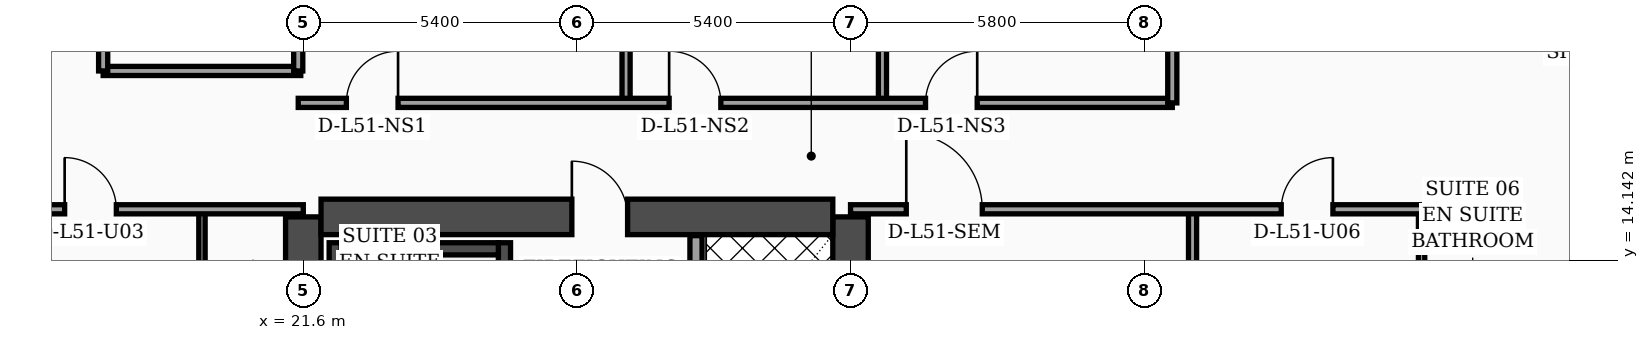
"""IFC4 building model, lengths in metres.
Left out: names, types, materials, properties, quantities, classifications, styles, units other than length and angle.
Written with IfcOpenShell. Run it as: python <this file> out.ifc"""

import sys

from ifc_helpers import new_model, si_unit, direction, frame, frame_2d, origin, place, context, subcontext, project, spatial, rectangle, extrude, element, fill, save


model = new_model("IFC4")
c1 = context("Model", 3, precision=1e-05, world=origin(), true_north=direction((0.0, 1.0)))
c2 = subcontext(c1, "Body", "Model", "MODEL_VIEW")
j1 = project(units=[si_unit("LENGTHUNIT", "METRE"), si_unit("PLANEANGLEUNIT", "RADIAN")], contexts=[c1])
p1 = place(None, origin())
s1 = spatial("IfcSite", under=j1, at=p1, CompositionType="ELEMENT")
p2 = place(p1, origin())
s2 = spatial("IfcBuilding", under=s1, at=p2, CompositionType="ELEMENT")
p3 = place(p2, frame((0.0, 0.0, 207.2)))
s3 = spatial("IfcBuildingStorey", under=s2, at=p3, CompositionType="ELEMENT", Elevation=207.2)
for number, where, z_axis, x_axis in (
    (1, (21.6, 4.6, 0.0), (0.0, 0.0, 1.0), (0.0, 1.0, 0.0)),
    (2, (32.4, 4.6, 0.0), (0.0, 0.0, 1.0), (0.0, 1.0, 0.0)),
):
    element("IfcWall", number, at=place(p3, frame(where, z_axis=z_axis, x_axis=x_axis)), inside=s3, PredefinedType="SHEAR", context=c2, shape_type="SweptSolid", body=[
        extrude(rectangle(XDim=10.4, YDim=0.7, at=frame_2d((5.2, 0.0))), origin(), (0.0, 0.0, 1.0), 3.56),
    ])
p4 = place(p3, frame((21.95, 15.0, 0.0), z_axis=(0.0, 0.0, 1.0), x_axis=(1.0, 0.0, 0.0)))
e3 = element("IfcWall", 3, at=p4, inside=s3, PredefinedType="SHEAR", context=c2, shape_type="SweptSolid", body=[
    extrude(rectangle(XDim=10.1, YDim=0.7, at=frame_2d((5.05, 0.0))), origin(), (0.0, 0.0, 1.0), 3.56),
])
p5 = place(p4, frame((4.95, 0.0, 0.0)))
e4 = element("IfcOpeningElement", 4, at=p5, cuts=e3, PredefinedType="OPENING", context=c2, shape_type="SweptSolid", body=[
    extrude(rectangle(XDim=1.1, YDim=2.2, at=frame_2d((0.55, 1.1))), frame((0.0, 0.36, 0.0), z_axis=(0.0, -1.0, 0.0), x_axis=(1.0, 0.0, 0.0)), (0.0, 0.0, 1.0), 0.72),
])
p6 = place(p3, frame((22.23, 4.95, 0.0), z_axis=(0.0, 0.0, 1.0), x_axis=(0.0, 1.0, 0.0)))
e5 = element("IfcWall", 5, at=p6, inside=s3, PredefinedType="SOLIDWALL", context=c2, shape_type="SweptSolid", body=[
    extrude(rectangle(XDim=9.54, YDim=0.24, at=frame_2d((4.77, 0.0))), origin(), (0.0, 0.0, 1.0), 3.56),
])
p7 = place(p3, frame((25.57, 4.95, 0.0), z_axis=(0.0, 0.0, 1.0), x_axis=(0.0, 1.0, 0.0)))
e6 = element("IfcWall", 6, at=p7, inside=s3, PredefinedType="SOLIDWALL", context=c2, shape_type="SweptSolid", body=[
    extrude(rectangle(XDim=9.54, YDim=0.24, at=frame_2d((4.77, 0.0))), origin(), (0.0, 0.0, 1.0), 3.56),
])
p8 = place(p7, frame((0.35, 0.0, 0.0)))
e7 = element("IfcOpeningElement", 7, at=p8, cuts=e6, PredefinedType="OPENING", context=c2, shape_type="SweptSolid", body=[
    extrude(rectangle(XDim=1.15, YDim=2.2, at=frame_2d((0.575, 1.1))), frame((0.0, 0.13, 0.0), z_axis=(0.0, -1.0, 0.0), x_axis=(1.0, 0.0, 0.0)), (0.0, 0.0, 1.0), 0.26),
])
p9 = place(p3, frame((22.35, 14.37, 0.0), z_axis=(0.0, 0.0, 1.0), x_axis=(1.0, 0.0, 0.0)))
e8 = element("IfcWall", 8, at=p9, inside=s3, PredefinedType="SOLIDWALL", context=c2, shape_type="SweptSolid", body=[
    extrude(rectangle(XDim=3.1, YDim=0.24, at=frame_2d((1.55, 0.0))), origin(), (0.0, 0.0, 1.0), 3.56),
])
p10 = place(p3, frame((52.23, 5.505, 0.0), z_axis=(0.0, 0.0, 1.0), x_axis=(-0.300509063924, 0.953778958931, 0.0)))
e9 = element("IfcWall", 9, at=p10, inside=s3, PredefinedType="SOLIDWALL", context=c2, shape_type="SweptSolid", body=[
    extrude(rectangle(XDim=30.814, YDim=0.32, at=frame_2d((15.407, 0.0))), origin(), (0.0, 0.0, 1.0), 3.56),
])
p11 = place(p10, frame((18.796, 0.0, 0.0)))
e10 = element("IfcOpeningElement", 10, at=p11, cuts=e9, PredefinedType="OPENING", context=c2, shape_type="SweptSolid", body=[
    extrude(rectangle(XDim=1.4, YDim=2.25, at=frame_2d((0.7, 1.125))), frame((0.0, 0.17, 0.0), z_axis=(0.0, -1.0, 0.0), x_axis=(1.0, 0.0, 0.0)), (0.0, 0.0, 1.0), 0.34),
])
p12 = place(p10, frame((4.437, 0.0, 0.7)))
e11 = element("IfcOpeningElement", 11, at=p12, cuts=e9, PredefinedType="OPENING", context=c2, shape_type="SweptSolid", body=[
    extrude(rectangle(XDim=1.6, YDim=1.65, at=frame_2d((0.8, 0.825))), frame((0.0, 0.17, 0.0), z_axis=(0.0, -1.0, 0.0), x_axis=(1.0, 0.0, 0.0)), (0.0, 0.0, 1.0), 0.34),
])
p13 = place(p10, frame((9.889, 0.0, 0.7)))
e12 = element("IfcOpeningElement", 12, at=p13, cuts=e9, PredefinedType="OPENING", context=c2, shape_type="SweptSolid", body=[
    extrude(rectangle(XDim=1.6, YDim=1.65, at=frame_2d((0.8, 0.825))), frame((0.0, 0.17, 0.0), z_axis=(0.0, -1.0, 0.0), x_axis=(1.0, 0.0, 0.0)), (0.0, 0.0, 1.0), 0.34),
])
p14 = place(p10, frame((1.6, 0.0, 0.75)))
e13 = element("IfcOpeningElement", 13, at=p14, cuts=e9, PredefinedType="OPENING", context=c2, shape_type="SweptSolid", body=[
    extrude(rectangle(XDim=1.5, YDim=1.6, at=frame_2d((0.75, 0.8))), frame((0.0, 0.17, 0.0), z_axis=(0.0, -1.0, 0.0), x_axis=(1.0, 0.0, 0.0)), (0.0, 0.0, 1.0), 0.34),
])
p15 = place(p10, frame((7.8, 0.0, 0.75)))
e14 = element("IfcOpeningElement", 14, at=p15, cuts=e9, PredefinedType="OPENING", context=c2, shape_type="SweptSolid", body=[
    extrude(rectangle(XDim=1.5, YDim=1.6, at=frame_2d((0.75, 0.8))), frame((0.0, 0.17, 0.0), z_axis=(0.0, -1.0, 0.0), x_axis=(1.0, 0.0, 0.0)), (0.0, 0.0, 1.0), 0.34),
])
p16 = place(p10, frame((11.95, 0.0, 0.75)))
e15 = element("IfcOpeningElement", 15, at=p16, cuts=e9, PredefinedType="OPENING", context=c2, shape_type="SweptSolid", body=[
    extrude(rectangle(XDim=1.5, YDim=1.6, at=frame_2d((0.75, 0.8))), frame((0.0, 0.17, 0.0), z_axis=(0.0, -1.0, 0.0), x_axis=(1.0, 0.0, 0.0)), (0.0, 0.0, 1.0), 0.34),
])
p17 = place(p10, frame((14.0, 0.0, 0.75)))
e16 = element("IfcOpeningElement", 16, at=p17, cuts=e9, PredefinedType="OPENING", context=c2, shape_type="SweptSolid", body=[
    extrude(rectangle(XDim=1.5, YDim=1.6, at=frame_2d((0.75, 0.8))), frame((0.0, 0.17, 0.0), z_axis=(0.0, -1.0, 0.0), x_axis=(1.0, 0.0, 0.0)), (0.0, 0.0, 1.0), 0.34),
])
p18 = place(p10, frame((16.55, 0.0, 0.75)))
e17 = element("IfcOpeningElement", 17, at=p18, cuts=e9, PredefinedType="OPENING", context=c2, shape_type="SweptSolid", body=[
    extrude(rectangle(XDim=1.5, YDim=1.6, at=frame_2d((0.75, 0.8))), frame((0.0, 0.17, 0.0), z_axis=(0.0, -1.0, 0.0), x_axis=(1.0, 0.0, 0.0)), (0.0, 0.0, 1.0), 0.34),
])
p19 = place(p10, frame((20.75, 0.0, 0.75)))
e18 = element("IfcOpeningElement", 18, at=p19, cuts=e9, PredefinedType="OPENING", context=c2, shape_type="SweptSolid", body=[
    extrude(rectangle(XDim=1.5, YDim=1.6, at=frame_2d((0.75, 0.8))), frame((0.0, 0.17, 0.0), z_axis=(0.0, -1.0, 0.0), x_axis=(1.0, 0.0, 0.0)), (0.0, 0.0, 1.0), 0.34),
])
p20 = place(p10, frame((23.3, 0.0, 0.75)))
e19 = element("IfcOpeningElement", 19, at=p20, cuts=e9, PredefinedType="OPENING", context=c2, shape_type="SweptSolid", body=[
    extrude(rectangle(XDim=1.5, YDim=1.6, at=frame_2d((0.75, 0.8))), frame((0.0, 0.17, 0.0), z_axis=(0.0, -1.0, 0.0), x_axis=(1.0, 0.0, 0.0)), (0.0, 0.0, 1.0), 0.34),
])
p21 = place(p10, frame((26.4, 0.0, 0.75)))
e20 = element("IfcOpeningElement", 20, at=p21, cuts=e9, PredefinedType="OPENING", context=c2, shape_type="SweptSolid", body=[
    extrude(rectangle(XDim=1.5, YDim=1.6, at=frame_2d((0.75, 0.8))), frame((0.0, 0.17, 0.0), z_axis=(0.0, -1.0, 0.0), x_axis=(1.0, 0.0, 0.0)), (0.0, 0.0, 1.0), 0.34),
])
p22 = place(p3, frame((29.35, 4.97, 0.0), z_axis=(0.0, 0.0, 1.0), x_axis=(0.0, 1.0, 0.0)))
e21 = element("IfcWall", 21, at=p22, inside=s3, PredefinedType="SOLIDWALL", context=c2, shape_type="SweptSolid", body=[
    extrude(rectangle(XDim=9.66, YDim=0.24, at=frame_2d((4.83, 0.0))), origin(), (0.0, 0.0, 1.0), 3.56),
])
p23 = place(p22, frame((0.55, 0.0, 0.0)))
e22 = element("IfcOpeningElement", 22, at=p23, cuts=e21, PredefinedType="OPENING", context=c2, shape_type="SweptSolid", body=[
    extrude(rectangle(XDim=1.3, YDim=2.35, at=frame_2d((0.65, 1.175))), frame((0.0, 0.13, 0.0), z_axis=(0.0, -1.0, 0.0), x_axis=(1.0, 0.0, 0.0)), (0.0, 0.0, 1.0), 0.26),
])
p24 = place(p3, frame((19.6, 2.44, 0.0), z_axis=(0.0, 0.0, 1.0), x_axis=(0.0, 1.0, 0.0)))
e23 = element("IfcWall", 23, at=p24, inside=s3, PredefinedType="PARTITIONING", context=c2, shape_type="SweptSolid", body=[
    extrude(rectangle(XDim=12.71, YDim=0.125, at=frame_2d((6.355, 0.0))), origin(), (0.0, 0.0, 1.0), 2.59),
])
p25 = place(p24, frame((4.34, 0.0, 0.0)))
e24 = element("IfcOpeningElement", 24, at=p25, cuts=e23, PredefinedType="OPENING", context=c2, shape_type="SweptSolid", body=[
    extrude(rectangle(XDim=0.96, YDim=2.2, at=frame_2d((0.48, 1.1))), frame((0.0, 0.073, 0.0), z_axis=(0.0, -1.0, 0.0), x_axis=(1.0, 0.0, 0.0)), (0.0, 0.0, 1.0), 0.145),
])
p26 = place(p24, frame((10.18, 0.0, 0.0)))
e25 = element("IfcOpeningElement", 25, at=p26, cuts=e23, PredefinedType="OPENING", context=c2, shape_type="SweptSolid", body=[
    extrude(rectangle(XDim=0.9, YDim=2.15, at=frame_2d((0.45, 1.075))), frame((0.0, 0.073, 0.0), z_axis=(0.0, -1.0, 0.0), x_axis=(1.0, 0.0, 0.0)), (0.0, 0.0, 1.0), 0.145),
])
p27 = place(p3, frame((15.15, 15.15, 0.0), z_axis=(0.0, 0.0, 1.0), x_axis=(1.0, 0.0, 0.0)))
e26 = element("IfcWall", 26, at=p27, inside=s3, PredefinedType="PARTITIONING", context=c2, shape_type="SweptSolid", body=[
    extrude(rectangle(XDim=6.45, YDim=0.18, at=frame_2d((3.225, 0.0))), origin(), (0.0, 0.0, 1.0), 2.59),
])
p28 = place(p27, frame((1.74, 0.0, 0.0)))
e27 = element("IfcOpeningElement", 27, at=p28, cuts=e26, PredefinedType="OPENING", context=c2, shape_type="SweptSolid", body=[
    extrude(rectangle(XDim=1.02, YDim=2.2, at=frame_2d((0.51, 1.1))), frame((0.0, 0.1, 0.0), z_axis=(0.0, -1.0, 0.0), x_axis=(1.0, 0.0, 0.0)), (0.0, 0.0, 1.0), 0.2),
])
p29 = place(p3, frame((17.65, 17.88, 0.0), z_axis=(0.0, 0.0, 1.0), x_axis=(1.0, 0.0, 0.0)))
e28 = element("IfcWall", 28, at=p29, inside=s3, PredefinedType="PARTITIONING", context=c2, shape_type="SweptSolid", body=[
    extrude(rectangle(XDim=3.9, YDim=0.18, at=frame_2d((1.95, 0.0))), origin(), (0.0, 0.0, 1.0), 3.56),
])
p30 = place(p3, frame((21.5, 17.88, 0.0), z_axis=(0.0, 0.0, 1.0), x_axis=(0.0, 1.0, 0.0)))
e29 = element("IfcWall", 29, at=p30, inside=s3, PredefinedType="PARTITIONING", context=c2, shape_type="SweptSolid", body=[
    extrude(rectangle(XDim=6.44, YDim=0.18, at=frame_2d((3.22, 0.0))), origin(), (0.0, 0.0, 1.0), 3.09),
])
p31 = place(p3, frame((17.65, 17.88, 0.0), z_axis=(0.0, 0.0, 1.0), x_axis=(0.0, 1.0, 0.0)))
e30 = element("IfcWall", 30, at=p31, inside=s3, PredefinedType="PARTITIONING", context=c2, shape_type="SweptSolid", body=[
    extrude(rectangle(XDim=6.44, YDim=0.18, at=frame_2d((3.22, 0.0))), origin(), (0.0, 0.0, 1.0), 3.09),
])
p32 = place(p31, frame((0.65, 0.0, 0.0)))
e31 = element("IfcOpeningElement", 31, at=p32, cuts=e30, PredefinedType="OPENING", context=c2, shape_type="SweptSolid", body=[
    extrude(rectangle(XDim=0.98, YDim=2.15, at=frame_2d((0.49, 1.075))), frame((0.0, 0.1, 0.0), z_axis=(0.0, -1.0, 0.0), x_axis=(1.0, 0.0, 0.0)), (0.0, 0.0, 1.0), 0.2),
])
p33 = place(p31, frame((3.97, 0.0, 0.0)))
e32 = element("IfcOpeningElement", 32, at=p33, cuts=e30, PredefinedType="OPENING", context=c2, shape_type="SweptSolid", body=[
    extrude(rectangle(XDim=0.96, YDim=2.2, at=frame_2d((0.48, 1.1))), frame((0.0, 0.1, 0.0), z_axis=(0.0, -1.0, 0.0), x_axis=(1.0, 0.0, 0.0)), (0.0, 0.0, 1.0), 0.2),
])
p34 = place(p3, frame((43.67, 2.44, 0.0), z_axis=(0.0, 0.0, 1.0), x_axis=(0.0, 1.0, 0.0)))
e33 = element("IfcWall", 33, at=p34, inside=s3, PredefinedType="PARTITIONING", context=c2, shape_type="SweptSolid", body=[
    extrude(rectangle(XDim=12.71, YDim=0.125, at=frame_2d((6.355, 0.0))), origin(), (0.0, 0.0, 1.0), 3.09),
])
p35 = place(p34, frame((4.35, 0.0, 0.0)))
e34 = element("IfcOpeningElement", 34, at=p35, cuts=e33, PredefinedType="OPENING", context=c2, shape_type="SweptSolid", body=[
    extrude(rectangle(XDim=0.96, YDim=2.2, at=frame_2d((0.48, 1.1))), frame((0.0, 0.073, 0.0), z_axis=(0.0, -1.0, 0.0), x_axis=(1.0, 0.0, 0.0)), (0.0, 0.0, 1.0), 0.145),
])
p36 = place(p34, frame((10.21, 0.0, 0.0)))
e35 = element("IfcOpeningElement", 35, at=p36, cuts=e33, PredefinedType="OPENING", context=c2, shape_type="SweptSolid", body=[
    extrude(rectangle(XDim=0.9, YDim=2.15, at=frame_2d((0.45, 1.075))), frame((0.0, 0.073, 0.0), z_axis=(0.0, -1.0, 0.0), x_axis=(1.0, 0.0, 0.0)), (0.0, 0.0, 1.0), 0.145),
])
p37 = place(p3, frame((39.15, 2.44, 0.0), z_axis=(0.0, 0.0, 1.0), x_axis=(0.0, 1.0, 0.0)))
e36 = element("IfcWall", 36, at=p37, inside=s3, PredefinedType="PARTITIONING", context=c2, shape_type="SweptSolid", body=[
    extrude(rectangle(XDim=12.71, YDim=0.16, at=frame_2d((6.355, 0.0))), origin(), (0.0, 0.0, 1.0), 2.94),
])
p38 = place(p3, frame((32.4, 15.15, 0.0), z_axis=(0.0, 0.0, 1.0), x_axis=(1.0, 0.0, 0.0)))
e37 = element("IfcWall", 37, at=p38, inside=s3, PredefinedType="PARTITIONING", context=c2, shape_type="SweptSolid", body=[
    extrude(rectangle(XDim=13.2, YDim=0.18, at=frame_2d((6.6, 0.0))), origin(), (0.0, 0.0, 1.0), 2.94),
])
p39 = place(p38, frame((1.1, 0.0, 0.0)))
e38 = element("IfcOpeningElement", 38, at=p39, cuts=e37, PredefinedType="OPENING", context=c2, shape_type="SweptSolid", body=[
    extrude(rectangle(XDim=1.5, YDim=2.22, at=frame_2d((0.75, 1.11))), frame((0.0, 0.1, 0.0), z_axis=(0.0, -1.0, 0.0), x_axis=(1.0, 0.0, 0.0)), (0.0, 0.0, 1.0), 0.2),
])
p40 = place(p38, frame((8.5, 0.0, 0.0)))
e39 = element("IfcOpeningElement", 39, at=p40, cuts=e37, PredefinedType="OPENING", context=c2, shape_type="SweptSolid", body=[
    extrude(rectangle(XDim=1.02, YDim=2.2, at=frame_2d((0.51, 1.1))), frame((0.0, 0.1, 0.0), z_axis=(0.0, -1.0, 0.0), x_axis=(1.0, 0.0, 0.0)), (0.0, 0.0, 1.0), 0.2),
])
p41 = place(p3, frame((27.97, 17.25, 0.0), z_axis=(0.0, 0.0, 1.0), x_axis=(0.0, 1.0, 0.0)))
e40 = element("IfcWall", 40, at=p41, inside=s3, PredefinedType="PARTITIONING", context=c2, shape_type="SweptSolid", body=[
    extrude(rectangle(XDim=12.21, YDim=0.16, at=frame_2d((6.105, 0.0))), origin(), (0.0, 0.0, 1.0), 2.94),
])
p42 = place(p3, frame((33.03, 17.25, 0.0), z_axis=(0.0, 0.0, 1.0), x_axis=(0.0, 1.0, 0.0)))
e41 = element("IfcWall", 41, at=p42, inside=s3, PredefinedType="PARTITIONING", context=c2, shape_type="SweptSolid", body=[
    extrude(rectangle(XDim=16.16, YDim=0.16, at=frame_2d((8.08, 0.0))), origin(), (0.0, 0.0, 1.0), 2.94),
])
p43 = place(p3, frame((21.5, 17.25, 0.0), z_axis=(0.0, 0.0, 1.0), x_axis=(1.0, 0.0, 0.0)))
e42 = element("IfcWall", 42, at=p43, inside=s3, PredefinedType="PARTITIONING", context=c2, shape_type="SweptSolid", body=[
    extrude(rectangle(XDim=17.25, YDim=0.18, at=frame_2d((8.625, 0.0))), origin(), (0.0, 0.0, 1.0), 2.94),
])
p44 = place(p43, frame((0.95, 0.0, 0.0)))
e43 = element("IfcOpeningElement", 43, at=p44, cuts=e42, PredefinedType="OPENING", context=c2, shape_type="SweptSolid", body=[
    extrude(rectangle(XDim=1.02, YDim=2.2, at=frame_2d((0.51, 1.1))), frame((0.0, 0.1, 0.0), z_axis=(0.0, -1.0, 0.0), x_axis=(1.0, 0.0, 0.0)), (0.0, 0.0, 1.0), 0.2),
])
p45 = place(p43, frame((7.32, 0.0, 0.0)))
e44 = element("IfcOpeningElement", 44, at=p45, cuts=e42, PredefinedType="OPENING", context=c2, shape_type="SweptSolid", body=[
    extrude(rectangle(XDim=1.02, YDim=2.2, at=frame_2d((0.51, 1.1))), frame((0.0, 0.1, 0.0), z_axis=(0.0, -1.0, 0.0), x_axis=(1.0, 0.0, 0.0)), (0.0, 0.0, 1.0), 0.2),
])
p46 = place(p43, frame((12.38, 0.0, 0.0)))
e45 = element("IfcOpeningElement", 45, at=p46, cuts=e42, PredefinedType="OPENING", context=c2, shape_type="SweptSolid", body=[
    extrude(rectangle(XDim=1.02, YDim=2.2, at=frame_2d((0.51, 1.1))), frame((0.0, 0.1, 0.0), z_axis=(0.0, -1.0, 0.0), x_axis=(1.0, 0.0, 0.0)), (0.0, 0.0, 1.0), 0.2),
])
p47 = place(p3, frame((38.75, 17.25, 0.0), z_axis=(0.0, 0.0, 1.0), x_axis=(0.0, 1.0, 0.0)))
e46 = element("IfcWall", 46, at=p47, inside=s3, PredefinedType="PARTITIONING", context=c2, shape_type="SweptSolid", body=[
    extrude(rectangle(XDim=20.63, YDim=0.18, at=frame_2d((10.315, 0.0))), origin(), (0.0, 0.0, 1.0), 2.94),
])
p48 = place(p28, origin())
e47 = element("IfcDoor", 47, at=p48, inside=s3, OperationType="SINGLE_SWING_LEFT", PredefinedType="DOOR", context=c2, shape_type="SweptSolid", body=[
    extrude(rectangle(XDim=1.02, YDim=2.2, at=frame_2d((0.51, 1.1))), frame((0.0, 0.025, 0.0), z_axis=(0.0, -1.0, 0.0), x_axis=(1.0, 0.0, 0.0)), (0.0, 0.0, 1.0), 0.05),
])
fill(e27, e47)
p49 = place(p39, origin())
e48 = element("IfcDoor", 48, at=p49, inside=s3, OperationType="SINGLE_SWING_LEFT", PredefinedType="DOOR", context=c2, shape_type="SweptSolid", body=[
    extrude(rectangle(XDim=1.5, YDim=2.22, at=frame_2d((0.75, 1.11))), frame((0.0, 0.025, 0.0), z_axis=(0.0, -1.0, 0.0), x_axis=(1.0, 0.0, 0.0)), (0.0, 0.0, 1.0), 0.05),
])
fill(e38, e48)
p50 = place(p40, origin())
e49 = element("IfcDoor", 49, at=p50, inside=s3, OperationType="SINGLE_SWING_RIGHT", PredefinedType="DOOR", context=c2, shape_type="SweptSolid", body=[
    extrude(rectangle(XDim=1.02, YDim=2.2, at=frame_2d((0.51, 1.1))), frame((0.0, 0.025, 0.0), z_axis=(0.0, -1.0, 0.0), x_axis=(1.0, 0.0, 0.0)), (0.0, 0.0, 1.0), 0.05),
])
fill(e39, e49)
p51 = place(p44, origin())
e50 = element("IfcDoor", 50, at=p51, inside=s3, OperationType="SINGLE_SWING_RIGHT", PredefinedType="DOOR", context=c2, shape_type="SweptSolid", body=[
    extrude(rectangle(XDim=1.02, YDim=2.2, at=frame_2d((0.51, 1.1))), frame((0.0, 0.025, 0.0), z_axis=(0.0, -1.0, 0.0), x_axis=(1.0, 0.0, 0.0)), (0.0, 0.0, 1.0), 0.05),
])
fill(e43, e50)
p52 = place(p45, origin())
e51 = element("IfcDoor", 51, at=p52, inside=s3, OperationType="SINGLE_SWING_LEFT", PredefinedType="DOOR", context=c2, shape_type="SweptSolid", body=[
    extrude(rectangle(XDim=1.02, YDim=2.2, at=frame_2d((0.51, 1.1))), frame((0.0, 0.025, 0.0), z_axis=(0.0, -1.0, 0.0), x_axis=(1.0, 0.0, 0.0)), (0.0, 0.0, 1.0), 0.05),
])
fill(e44, e51)
p53 = place(p46, origin())
e52 = element("IfcDoor", 52, at=p53, inside=s3, OperationType="SINGLE_SWING_RIGHT", PredefinedType="DOOR", context=c2, shape_type="SweptSolid", body=[
    extrude(rectangle(XDim=1.02, YDim=2.2, at=frame_2d((0.51, 1.1))), frame((0.0, 0.025, 0.0), z_axis=(0.0, -1.0, 0.0), x_axis=(1.0, 0.0, 0.0)), (0.0, 0.0, 1.0), 0.05),
])
fill(e45, e52)
p54 = place(p5, origin())
e53 = element("IfcDoor", 53, at=p54, inside=s3, OperationType="SINGLE_SWING_LEFT", PredefinedType="DOOR", context=c2, shape_type="SweptSolid", body=[
    extrude(rectangle(XDim=1.1, YDim=2.2, at=frame_2d((0.55, 1.1))), frame((0.0, 0.025, 0.0), z_axis=(0.0, -1.0, 0.0), x_axis=(1.0, 0.0, 0.0)), (0.0, 0.0, 1.0), 0.05),
])
fill(e4, e53)
save(model, sys.argv[1])
